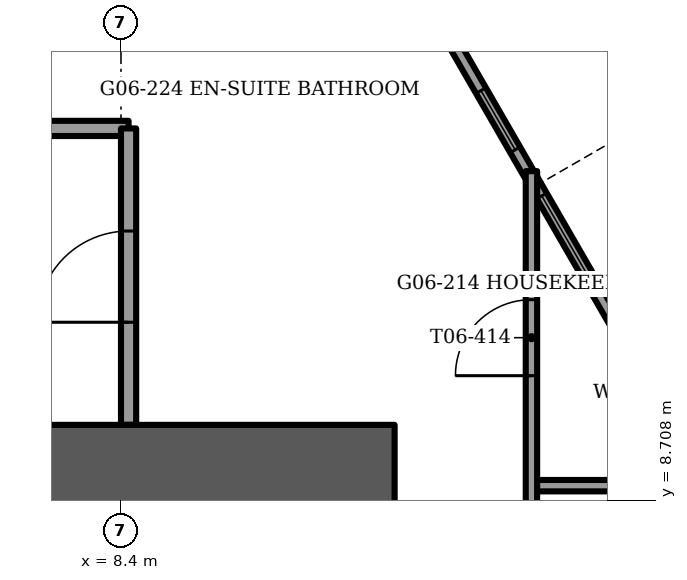
"""IFC4 building model, lengths in metres.
Left out: names, types, materials, properties, quantities, classifications, styles, units other than length and angle.
Written with IfcOpenShell. Run it as: python <this file> out.ifc"""

import sys

from ifc_helpers import new_model, si_unit, direction, frame, frame_2d, origin, place, context, subcontext, project, spatial, rectangle, extrude, element, fill, save


model = new_model("IFC4")
c1 = context("Model", 3, precision=1e-05, world=origin(), true_north=direction((0.0, 1.0)))
c2 = subcontext(c1, "Body", "Model", "MODEL_VIEW")
j1 = project(units=[si_unit("LENGTHUNIT", "METRE"), si_unit("PLANEANGLEUNIT", "RADIAN")], contexts=[c1])
p1 = place(None, origin())
s1 = spatial("IfcSite", under=j1, at=p1, CompositionType="ELEMENT")
p2 = place(p1, origin())
s2 = spatial("IfcBuilding", under=s1, at=p2, CompositionType="ELEMENT")
p3 = place(p2, frame((0.0, 0.0, 28.0)))
s3 = spatial("IfcBuildingStorey", under=s2, at=p3, CompositionType="ELEMENT", Elevation=28.0)
p4 = place(p3, frame((-12.0, 9.1, -0.3), z_axis=(0.0, 0.0, 1.0), x_axis=(1.0, 0.0, 0.0)))
e1 = element("IfcWall", 1, at=p4, inside=s3, PredefinedType="SHEAR", context=c2, shape_type="SweptSolid", body=[
    extrude(rectangle(XDim=24.0, YDim=1.2, at=frame_2d((12.0, 0.0))), origin(), (0.0, 0.0, 1.0), 3.75),
])
p5 = place(p4, frame((11.2, 0.0, 0.0)))
e2 = element("IfcOpeningElement", 2, at=p5, cuts=e1, PredefinedType="OPENING", context=c2, shape_type="SweptSolid", body=[
    extrude(rectangle(XDim=1.6, YDim=2.1, at=frame_2d((0.8, 1.05))), frame((0.0, 0.6, 0.0), z_axis=(0.0, -1.0, 0.0), x_axis=(1.0, 0.0, 0.0)), (0.0, 0.0, 1.0), 1.2),
])
p6 = place(p4, frame((5.25, 0.0, 0.0)))
e3 = element("IfcOpeningElement", 3, at=p6, cuts=e1, PredefinedType="OPENING", context=c2, shape_type="SweptSolid", body=[
    extrude(rectangle(XDim=1.1, YDim=2.1, at=frame_2d((0.55, 1.05))), frame((0.0, 0.6, 0.0), z_axis=(0.0, -1.0, 0.0), x_axis=(1.0, 0.0, 0.0)), (0.0, 0.0, 1.0), 1.2),
])
p7 = place(p4, frame((17.65, 0.0, 0.0)))
e4 = element("IfcOpeningElement", 4, at=p7, cuts=e1, PredefinedType="OPENING", context=c2, shape_type="SweptSolid", body=[
    extrude(rectangle(XDim=1.1, YDim=2.1, at=frame_2d((0.55, 1.05))), frame((0.0, 0.6, 0.0), z_axis=(0.0, -1.0, 0.0), x_axis=(1.0, 0.0, 0.0)), (0.0, 0.0, 1.0), 1.2),
])
p8 = place(p3, frame((20.968, 0.532, 0.0), z_axis=(0.0, 0.0, 1.0), x_axis=(-0.500000010132, 0.866025397935, 0.0)))
e5 = element("IfcWall", 5, at=p8, inside=s3, PredefinedType="SOLIDWALL", context=c2, shape_type="SweptSolid", body=[
    extrude(rectangle(XDim=22.817, YDim=0.15, at=frame_2d((11.408, 0.0))), origin(), (0.0, 0.0, 1.0), 3.45),
])
p9 = place(p8, frame((5.136, 0.0, 0.15)))
e6 = element("IfcOpeningElement", 6, at=p9, cuts=e5, PredefinedType="OPENING", context=c2, shape_type="SweptSolid", body=[
    extrude(rectangle(XDim=0.9, YDim=2.85, at=frame_2d((0.45, 1.425))), frame((0.0, 0.075, 0.0), z_axis=(0.0, -1.0, 0.0), x_axis=(1.0, 0.0, 0.0)), (0.0, 0.0, 1.0), 0.15),
])
p10 = place(p8, frame((6.123, 0.0, 0.0)))
e7 = element("IfcOpeningElement", 7, at=p10, cuts=e5, PredefinedType="OPENING", context=c2, shape_type="SweptSolid", body=[
    extrude(rectangle(XDim=1.5, YDim=2.4, at=frame_2d((0.75, 1.2))), frame((0.0, 0.075, 0.0), z_axis=(0.0, -1.0, 0.0), x_axis=(1.0, 0.0, 0.0)), (0.0, 0.0, 1.0), 0.15),
])
p11 = place(p8, frame((8.223, 0.0, 0.15)))
e8 = element("IfcOpeningElement", 8, at=p11, cuts=e5, PredefinedType="OPENING", context=c2, shape_type="SweptSolid", body=[
    extrude(rectangle(XDim=0.9, YDim=2.85, at=frame_2d((0.45, 1.425))), frame((0.0, 0.075, 0.0), z_axis=(0.0, -1.0, 0.0), x_axis=(1.0, 0.0, 0.0)), (0.0, 0.0, 1.0), 0.15),
])
p12 = place(p8, frame((10.323, 0.0, 0.15)))
e9 = element("IfcOpeningElement", 9, at=p12, cuts=e5, PredefinedType="OPENING", context=c2, shape_type="SweptSolid", body=[
    extrude(rectangle(XDim=1.5, YDim=2.85, at=frame_2d((0.75, 1.425))), frame((0.0, 0.075, 0.0), z_axis=(0.0, -1.0, 0.0), x_axis=(1.0, 0.0, 0.0)), (0.0, 0.0, 1.0), 0.15),
])
p13 = place(p8, frame((14.764, 0.0, 0.15)))
e10 = element("IfcOpeningElement", 10, at=p13, cuts=e5, PredefinedType="OPENING", context=c2, shape_type="SweptSolid", body=[
    extrude(rectangle(XDim=0.9, YDim=2.85, at=frame_2d((0.45, 1.425))), frame((0.0, 0.075, 0.0), z_axis=(0.0, -1.0, 0.0), x_axis=(1.0, 0.0, 0.0)), (0.0, 0.0, 1.0), 0.15),
])
p14 = place(p8, frame((12.564, 0.0, 0.15)))
e11 = element("IfcOpeningElement", 11, at=p14, cuts=e5, PredefinedType="OPENING", context=c2, shape_type="SweptSolid", body=[
    extrude(rectangle(XDim=1.5, YDim=2.85, at=frame_2d((0.75, 1.425))), frame((0.0, 0.075, 0.0), z_axis=(0.0, -1.0, 0.0), x_axis=(1.0, 0.0, 0.0)), (0.0, 0.0, 1.0), 0.15),
])
p15 = place(p8, frame((18.294, 0.0, 0.15)))
e12 = element("IfcOpeningElement", 12, at=p15, cuts=e5, PredefinedType="OPENING", context=c2, shape_type="SweptSolid", body=[
    extrude(rectangle(XDim=1.5, YDim=2.85, at=frame_2d((0.75, 1.425))), frame((0.0, 0.075, 0.0), z_axis=(0.0, -1.0, 0.0), x_axis=(1.0, 0.0, 0.0)), (0.0, 0.0, 1.0), 0.15),
])
p16 = place(p8, frame((0.993, 0.0, 0.15)))
e13 = element("IfcOpeningElement", 13, at=p16, cuts=e5, PredefinedType="OPENING", context=c2, shape_type="SweptSolid", body=[
    extrude(rectangle(XDim=1.8, YDim=2.73, at=frame_2d((0.9, 1.365))), frame((0.0, 0.075, 0.0), z_axis=(0.0, -1.0, 0.0), x_axis=(1.0, 0.0, 0.0)), (0.0, 0.0, 1.0), 0.15),
])
p17 = place(p8, frame((20.82, 0.0, 0.15)))
e14 = element("IfcOpeningElement", 14, at=p17, cuts=e5, PredefinedType="OPENING", context=c2, shape_type="SweptSolid", body=[
    extrude(rectangle(XDim=1.8, YDim=2.73, at=frame_2d((0.9, 1.365))), frame((0.0, 0.075, 0.0), z_axis=(0.0, -1.0, 0.0), x_axis=(1.0, 0.0, 0.0)), (0.0, 0.0, 1.0), 0.15),
])
p18 = place(p3, frame((-8.5, 13.6, 0.0), z_axis=(0.0, 0.0, 1.0), x_axis=(1.0, 0.0, 0.0)))
e15 = element("IfcWall", 15, at=p18, inside=s3, PredefinedType="PARTITIONING", context=c2, shape_type="SweptSolid", body=[
    extrude(rectangle(XDim=17.0, YDim=0.2, at=frame_2d((8.5, 0.0))), origin(), (0.0, 0.0, 1.0), 3.45),
])
p19 = place(p18, frame((8.0, 0.0, 0.0)))
e16 = element("IfcOpeningElement", 16, at=p19, cuts=e15, PredefinedType="OPENING", context=c2, shape_type="SweptSolid", body=[
    extrude(rectangle(XDim=1.0, YDim=2.1, at=frame_2d((0.5, 1.05))), frame((0.0, 0.1, 0.0), z_axis=(0.0, -1.0, 0.0), x_axis=(1.0, 0.0, 0.0)), (0.0, 0.0, 1.0), 0.2),
])
p20 = place(p3, frame((8.5, 9.7, 0.0), z_axis=(0.0, 0.0, 1.0), x_axis=(0.0, 1.0, 0.0)))
e17 = element("IfcWall", 17, at=p20, inside=s3, PredefinedType="PARTITIONING", context=c2, shape_type="SweptSolid", body=[
    extrude(rectangle(XDim=3.9, YDim=0.2, at=frame_2d((1.95, 0.0))), origin(), (0.0, 0.0, 1.0), 3.45),
])
p21 = place(p20, frame((1.35, 0.0, 0.0)))
e18 = element("IfcOpeningElement", 18, at=p21, cuts=e17, PredefinedType="OPENING", context=c2, shape_type="SweptSolid", body=[
    extrude(rectangle(XDim=1.2, YDim=2.1, at=frame_2d((0.6, 1.05))), frame((0.0, 0.1, 0.0), z_axis=(0.0, -1.0, 0.0), x_axis=(1.0, 0.0, 0.0)), (0.0, 0.0, 1.0), 0.2),
])
p22 = place(p3, frame((13.8, 8.9, 0.0), z_axis=(0.0, 0.0, 1.0), x_axis=(1.0, 0.0, 0.0)))
e19 = element("IfcWall", 19, at=p22, inside=s3, PredefinedType="PARTITIONING", context=c2, shape_type="SweptSolid", body=[
    extrude(rectangle(XDim=2.389, YDim=0.15, at=frame_2d((1.194, 0.0))), origin(), (0.0, 0.0, 1.0), 3.45),
])
p23 = place(p3, frame((13.8, -3.7, 0.0), z_axis=(0.0, 0.0, 1.0), x_axis=(0.0, 1.0, 0.0)))
e20 = element("IfcWall", 20, at=p23, inside=s3, PredefinedType="PARTITIONING", context=c2, shape_type="SweptSolid", body=[
    extrude(rectangle(XDim=16.738, YDim=0.15, at=frame_2d((8.369, 0.0))), origin(), (0.0, 0.0, 1.0), 3.45),
])
p24 = place(p23, frame((2.95, 0.0, 0.0)))
e21 = element("IfcOpeningElement", 21, at=p24, cuts=e20, PredefinedType="OPENING", context=c2, shape_type="SweptSolid", body=[
    extrude(rectangle(XDim=1.0, YDim=2.1, at=frame_2d((0.5, 1.05))), frame((0.0, 0.075, 0.0), z_axis=(0.0, -1.0, 0.0), x_axis=(1.0, 0.0, 0.0)), (0.0, 0.0, 1.0), 0.15),
])
p25 = place(p23, frame((10.0, 0.0, 0.0)))
e22 = element("IfcOpeningElement", 22, at=p25, cuts=e20, PredefinedType="OPENING", context=c2, shape_type="SweptSolid", body=[
    extrude(rectangle(XDim=1.0, YDim=2.1, at=frame_2d((0.5, 1.05))), frame((0.0, 0.075, 0.0), z_axis=(0.0, -1.0, 0.0), x_axis=(1.0, 0.0, 0.0)), (0.0, 0.0, 1.0), 0.15),
])
p26 = place(p23, frame((14.047, 0.0, 0.0)))
e23 = element("IfcOpeningElement", 23, at=p26, cuts=e20, PredefinedType="OPENING", context=c2, shape_type="SweptSolid", body=[
    extrude(rectangle(XDim=1.0, YDim=2.1, at=frame_2d((0.5, 1.05))), frame((0.0, 0.075, 0.0), z_axis=(0.0, -1.0, 0.0), x_axis=(1.0, 0.0, 0.0)), (0.0, 0.0, 1.0), 0.15),
])
p27 = place(p13, origin())
e24 = element("IfcWindow", 24, at=p27, inside=s3, PartitioningType="SINGLE_PANEL", PredefinedType="WINDOW", context=c2, shape_type="SweptSolid", body=[
    extrude(rectangle(XDim=0.9, YDim=2.85, at=frame_2d((0.45, 1.425))), frame((0.0, 0.03, 0.0), z_axis=(0.0, -1.0, 0.0), x_axis=(1.0, 0.0, 0.0)), (0.0, 0.0, 1.0), 0.06),
])
fill(e10, e24)
p28 = place(p14, origin())
e25 = element("IfcWindow", 25, at=p28, inside=s3, PartitioningType="SINGLE_PANEL", PredefinedType="WINDOW", context=c2, shape_type="SweptSolid", body=[
    extrude(rectangle(XDim=1.5, YDim=2.85, at=frame_2d((0.75, 1.425))), frame((0.0, 0.03, 0.0), z_axis=(0.0, -1.0, 0.0), x_axis=(1.0, 0.0, 0.0)), (0.0, 0.0, 1.0), 0.06),
])
fill(e11, e25)
p29 = place(p21, origin())
e26 = element("IfcDoor", 26, at=p29, inside=s3, OperationType="SINGLE_SWING_LEFT", PredefinedType="DOOR", context=c2, shape_type="SweptSolid", body=[
    extrude(rectangle(XDim=1.2, YDim=2.1, at=frame_2d((0.6, 1.05))), frame((0.0, 0.025, 0.0), z_axis=(0.0, -1.0, 0.0), x_axis=(1.0, 0.0, 0.0)), (0.0, 0.0, 1.0), 0.05),
])
fill(e18, e26)
p30 = place(p26, origin())
e27 = element("IfcDoor", 27, at=p30, inside=s3, OperationType="SINGLE_SWING_LEFT", PredefinedType="DOOR", context=c2, shape_type="SweptSolid", body=[
    extrude(rectangle(XDim=1.0, YDim=2.1, at=frame_2d((0.5, 1.05))), frame((0.0, 0.025, 0.0), z_axis=(0.0, -1.0, 0.0), x_axis=(1.0, 0.0, 0.0)), (0.0, 0.0, 1.0), 0.05),
])
fill(e23, e27)
save(model, sys.argv[1])
